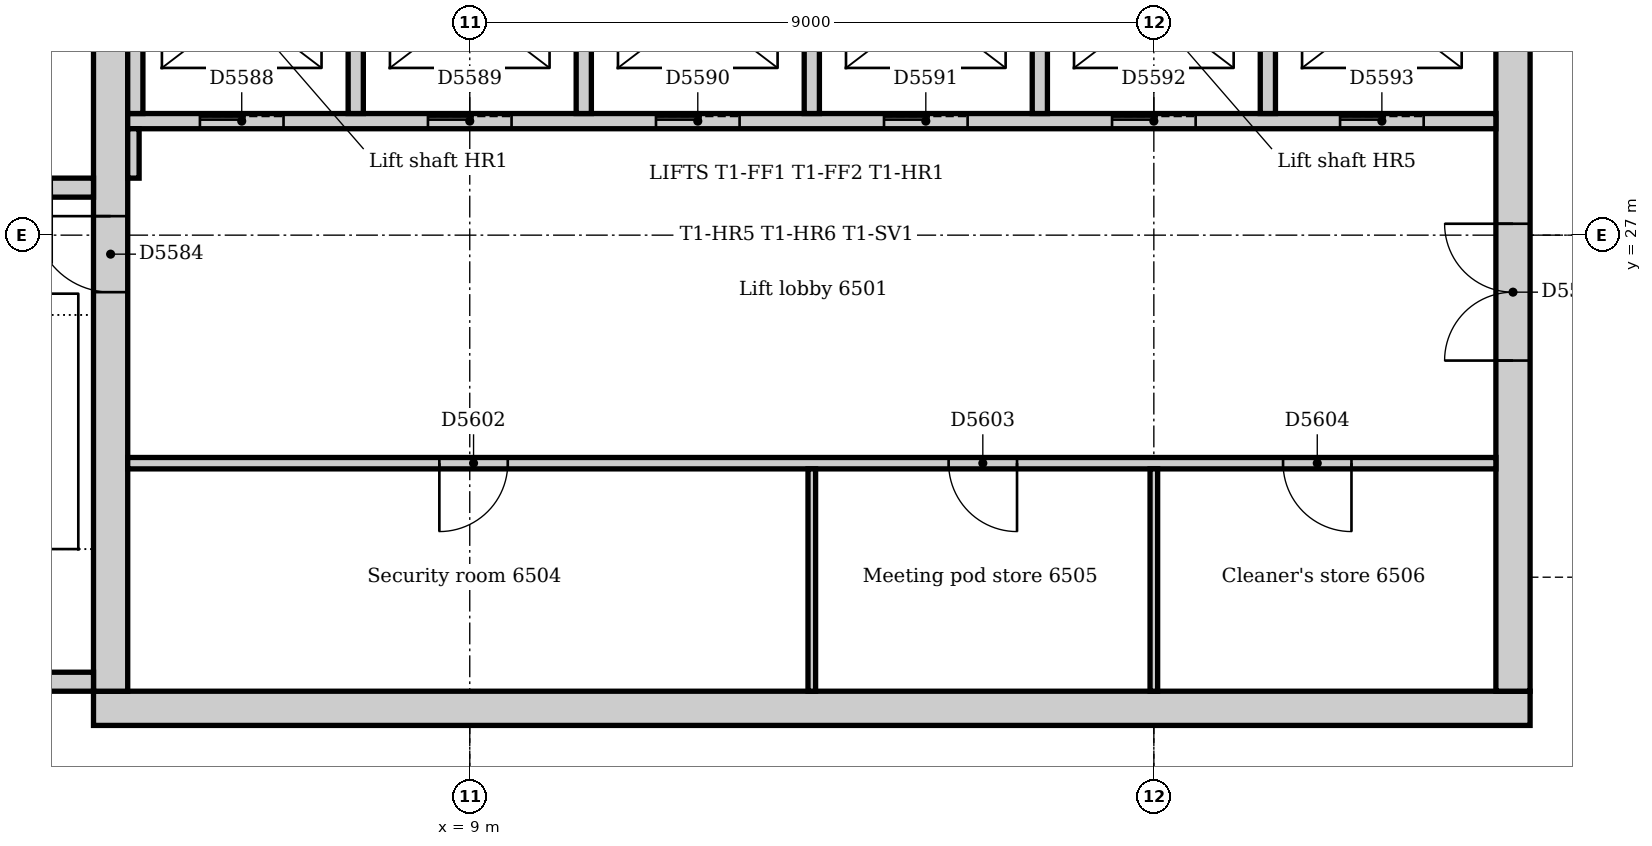
"""IFC4 building model, lengths in metres.
Left out: names, types, materials, properties, quantities, classifications, styles, units other than length and angle.
Written with IfcOpenShell. Run it as: python <this file> out.ifc"""

import sys

from ifc_helpers import new_model, si_unit, direction, frame, frame_2d, origin, place, context, subcontext, project, spatial, rectangle, extrude, element, fill, save


model = new_model("IFC4")
c1 = context("Model", 3, precision=1e-05, world=origin(), true_north=direction((0.0, 1.0)))
c2 = subcontext(c1, "Body", "Model", "MODEL_VIEW")
j1 = project(units=[si_unit("LENGTHUNIT", "METRE"), si_unit("PLANEANGLEUNIT", "RADIAN")], contexts=[c1])
p1 = place(None, origin())
s1 = spatial("IfcSite", under=j1, at=p1, CompositionType="ELEMENT")
p2 = place(p1, origin())
s2 = spatial("IfcBuilding", under=s1, at=p2, CompositionType="ELEMENT")
p3 = place(p2, frame((0.0, 0.0, 271.0)))
s3 = spatial("IfcBuildingStorey", under=s2, at=p3, CompositionType="ELEMENT", Elevation=271.0)
p4 = place(p3, frame((4.05, 20.775, 0.0), z_axis=(0.0, 0.0, 1.0), x_axis=(1.0, 0.0, 0.0)))
e1 = element("IfcWall", 1, at=p4, inside=s3, PredefinedType="SOLIDWALL", context=c2, shape_type="SweptSolid", body=[
    extrude(rectangle(XDim=18.9, YDim=0.45, at=frame_2d((9.45, 0.0))), origin(), (0.0, 0.0, 1.0), 4.0),
])
p5 = place(p3, frame((22.725, 21.0, 0.0), z_axis=(0.0, 0.0, 1.0), x_axis=(0.0, 1.0, 0.0)))
e2 = element("IfcWall", 2, at=p5, inside=s3, PredefinedType="SOLIDWALL", context=c2, shape_type="SweptSolid", body=[
    extrude(rectangle(XDim=10.5, YDim=0.45, at=frame_2d((5.25, 0.0))), origin(), (0.0, 0.0, 1.0), 4.0),
])
p6 = place(p5, frame((4.35, 0.0, 0.0)))
e3 = element("IfcOpeningElement", 3, at=p6, cuts=e2, PredefinedType="OPENING", context=c2, shape_type="SweptSolid", body=[
    extrude(rectangle(XDim=1.8, YDim=2.1, at=frame_2d((0.9, 1.05))), frame((0.0, 0.235, 0.0), z_axis=(0.0, -1.0, 0.0), x_axis=(1.0, 0.0, 0.0)), (0.0, 0.0, 1.0), 0.47),
])
p7 = place(p3, frame((4.275, 31.5, 0.0), z_axis=(0.0, 0.0, 1.0), x_axis=(0.0, -1.0, 0.0)))
e4 = element("IfcWall", 4, at=p7, inside=s3, PredefinedType="SOLIDWALL", context=c2, shape_type="SweptSolid", body=[
    extrude(rectangle(XDim=10.5, YDim=0.45, at=frame_2d((5.25, 0.0))), origin(), (0.0, 0.0, 1.0), 4.0),
])
p8 = place(p7, frame((4.25, 0.0, 0.0)))
e5 = element("IfcOpeningElement", 5, at=p8, cuts=e4, PredefinedType="OPENING", context=c2, shape_type="SweptSolid", body=[
    extrude(rectangle(XDim=1.0, YDim=2.1, at=frame_2d((0.5, 1.05))), frame((0.0, 0.235, 0.0), z_axis=(0.0, -1.0, 0.0), x_axis=(1.0, 0.0, 0.0)), (0.0, 0.0, 1.0), 0.47),
])
p9 = place(p3, frame((0.36, 21.125, 0.0), z_axis=(0.0, 0.0, 1.0), x_axis=(1.0, 0.0, 0.0)))
e6 = element("IfcWall", 6, at=p9, inside=s3, PredefinedType="SOLIDWALL", context=c2, shape_type="SweptSolid", body=[
    extrude(rectangle(XDim=3.69, YDim=0.25, at=frame_2d((1.845, 0.0))), origin(), (0.0, 0.0, 1.0), 4.0),
])
p10 = place(p3, frame((4.05, 27.625, 0.0), z_axis=(0.0, 0.0, 1.0), x_axis=(-1.0, 0.0, 0.0)))
e7 = element("IfcWall", 7, at=p10, inside=s3, PredefinedType="SOLIDWALL", context=c2, shape_type="SweptSolid", body=[
    extrude(rectangle(XDim=3.69, YDim=0.25, at=frame_2d((1.845, 0.0))), origin(), (0.0, 0.0, 1.0), 4.0),
])
p11 = place(p10, frame((0.55, 0.0, 0.0)))
e8 = element("IfcOpeningElement", 8, at=p11, cuts=e7, PredefinedType="OPENING", context=c2, shape_type="SweptSolid", body=[
    extrude(rectangle(XDim=1.0, YDim=2.1, at=frame_2d((0.5, 1.05))), frame((0.0, 0.135, 0.0), z_axis=(0.0, -1.0, 0.0), x_axis=(1.0, 0.0, 0.0)), (0.0, 0.0, 1.0), 0.27),
])
p12 = place(p3, frame((4.5, 28.5, 0.0), z_axis=(0.0, 0.0, 1.0), x_axis=(1.0, 0.0, 0.0)))
e9 = element("IfcWall", 9, at=p12, inside=s3, PredefinedType="PARTITIONING", context=c2, shape_type="SweptSolid", body=[
    extrude(rectangle(XDim=18.0, YDim=0.2, at=frame_2d((9.0, 0.0))), origin(), (0.0, 0.0, 1.0), 3.85),
])
p13 = place(p12, frame((0.95, 0.0, 0.0)))
e10 = element("IfcOpeningElement", 10, at=p13, cuts=e9, PredefinedType="OPENING", context=c2, shape_type="SweptSolid", body=[
    extrude(rectangle(XDim=1.1, YDim=2.1, at=frame_2d((0.55, 1.05))), frame((0.0, 0.11, 0.0), z_axis=(0.0, -1.0, 0.0), x_axis=(1.0, 0.0, 0.0)), (0.0, 0.0, 1.0), 0.22),
])
p14 = place(p12, frame((3.95, 0.0, 0.0)))
e11 = element("IfcOpeningElement", 11, at=p14, cuts=e9, PredefinedType="OPENING", context=c2, shape_type="SweptSolid", body=[
    extrude(rectangle(XDim=1.1, YDim=2.1, at=frame_2d((0.55, 1.05))), frame((0.0, 0.11, 0.0), z_axis=(0.0, -1.0, 0.0), x_axis=(1.0, 0.0, 0.0)), (0.0, 0.0, 1.0), 0.22),
])
p15 = place(p12, frame((6.95, 0.0, 0.0)))
e12 = element("IfcOpeningElement", 12, at=p15, cuts=e9, PredefinedType="OPENING", context=c2, shape_type="SweptSolid", body=[
    extrude(rectangle(XDim=1.1, YDim=2.1, at=frame_2d((0.55, 1.05))), frame((0.0, 0.11, 0.0), z_axis=(0.0, -1.0, 0.0), x_axis=(1.0, 0.0, 0.0)), (0.0, 0.0, 1.0), 0.22),
])
p16 = place(p12, frame((9.95, 0.0, 0.0)))
e13 = element("IfcOpeningElement", 13, at=p16, cuts=e9, PredefinedType="OPENING", context=c2, shape_type="SweptSolid", body=[
    extrude(rectangle(XDim=1.1, YDim=2.1, at=frame_2d((0.55, 1.05))), frame((0.0, 0.11, 0.0), z_axis=(0.0, -1.0, 0.0), x_axis=(1.0, 0.0, 0.0)), (0.0, 0.0, 1.0), 0.22),
])
p17 = place(p12, frame((12.95, 0.0, 0.0)))
e14 = element("IfcOpeningElement", 14, at=p17, cuts=e9, PredefinedType="OPENING", context=c2, shape_type="SweptSolid", body=[
    extrude(rectangle(XDim=1.1, YDim=2.1, at=frame_2d((0.55, 1.05))), frame((0.0, 0.11, 0.0), z_axis=(0.0, -1.0, 0.0), x_axis=(1.0, 0.0, 0.0)), (0.0, 0.0, 1.0), 0.22),
])
p18 = place(p12, frame((15.95, 0.0, 0.0)))
e15 = element("IfcOpeningElement", 15, at=p18, cuts=e9, PredefinedType="OPENING", context=c2, shape_type="SweptSolid", body=[
    extrude(rectangle(XDim=1.1, YDim=2.1, at=frame_2d((0.55, 1.05))), frame((0.0, 0.11, 0.0), z_axis=(0.0, -1.0, 0.0), x_axis=(1.0, 0.0, 0.0)), (0.0, 0.0, 1.0), 0.22),
])
for number, where, z_axis, x_axis in (
    (16, (10.5, 28.6, 0.0), (0.0, 0.0, 1.0), (0.0, 1.0, 0.0)),
    (17, (13.5, 28.6, 0.0), (0.0, 0.0, 1.0), (0.0, 1.0, 0.0)),
    (18, (16.5, 28.6, 0.0), (0.0, 0.0, 1.0), (0.0, 1.0, 0.0)),
    (19, (19.5, 28.6, 0.0), (0.0, 0.0, 1.0), (0.0, 1.0, 0.0)),
    (20, (4.6, 28.6, 0.0), (0.0, 0.0, 1.0), (0.0, 1.0, 0.0)),
    (21, (7.5, 28.6, 0.0), (0.0, 0.0, 1.0), (0.0, 1.0, 0.0)),
):
    element("IfcWall", number, at=place(p3, frame(where, z_axis=z_axis, x_axis=x_axis)), inside=s3, PredefinedType="PARTITIONING", context=c2, shape_type="SweptSolid", body=[
        extrude(rectangle(XDim=2.65, YDim=0.2, at=frame_2d((1.325, 0.0))), origin(), (0.0, 0.0, 1.0), 3.85),
    ])
p19 = place(p3, frame((4.5, 24.0, 0.0), z_axis=(0.0, 0.0, 1.0), x_axis=(1.0, 0.0, 0.0)))
e22 = element("IfcWall", 22, at=p19, inside=s3, PredefinedType="PARTITIONING", context=c2, shape_type="SweptSolid", body=[
    extrude(rectangle(XDim=18.0, YDim=0.15, at=frame_2d((9.0, 0.0))), origin(), (0.0, 0.0, 1.0), 3.85),
])
p20 = place(p19, frame((4.1, 0.0, 0.0)))
e23 = element("IfcOpeningElement", 23, at=p20, cuts=e22, PredefinedType="OPENING", context=c2, shape_type="SweptSolid", body=[
    extrude(rectangle(XDim=0.9, YDim=2.1, at=frame_2d((0.45, 1.05))), frame((0.0, 0.085, 0.0), z_axis=(0.0, -1.0, 0.0), x_axis=(1.0, 0.0, 0.0)), (0.0, 0.0, 1.0), 0.17),
])
p21 = place(p19, frame((10.8, 0.0, 0.0)))
e24 = element("IfcOpeningElement", 24, at=p21, cuts=e22, PredefinedType="OPENING", context=c2, shape_type="SweptSolid", body=[
    extrude(rectangle(XDim=0.9, YDim=2.1, at=frame_2d((0.45, 1.05))), frame((0.0, 0.085, 0.0), z_axis=(0.0, -1.0, 0.0), x_axis=(1.0, 0.0, 0.0)), (0.0, 0.0, 1.0), 0.17),
])
p22 = place(p19, frame((15.2, 0.0, 0.0)))
e25 = element("IfcOpeningElement", 25, at=p22, cuts=e22, PredefinedType="OPENING", context=c2, shape_type="SweptSolid", body=[
    extrude(rectangle(XDim=0.9, YDim=2.1, at=frame_2d((0.45, 1.05))), frame((0.0, 0.085, 0.0), z_axis=(0.0, -1.0, 0.0), x_axis=(1.0, 0.0, 0.0)), (0.0, 0.0, 1.0), 0.17),
])
p23 = place(p3, frame((4.575, 27.75, 0.0), z_axis=(0.0, 0.0, 1.0), x_axis=(0.0, 1.0, 0.0)))
e26 = element("IfcWall", 26, at=p23, inside=s3, PredefinedType="PARTITIONING", context=c2, shape_type="SweptSolid", body=[
    extrude(rectangle(XDim=0.65, YDim=0.15, at=frame_2d((0.325, 0.0))), origin(), (0.0, 0.0, 1.0), 3.85),
])
for number, where, z_axis, x_axis in (
    (27, (13.5, 21.0, 0.0), (0.0, 0.0, 1.0), (0.0, 1.0, 0.0)),
    (28, (18.0, 21.0, 0.0), (0.0, 0.0, 1.0), (0.0, 1.0, 0.0)),
):
    element("IfcWall", number, at=place(p3, frame(where, z_axis=z_axis, x_axis=x_axis)), inside=s3, PredefinedType="PARTITIONING", context=c2, shape_type="SweptSolid", body=[
        extrude(rectangle(XDim=2.925, YDim=0.1, at=frame_2d((1.462, 0.0))), origin(), (0.0, 0.0, 1.0), 3.85),
    ])
p24 = place(p8, frame((1.0, 0.0, 0.0), z_axis=(0.0, 0.0, 1.0), x_axis=(-1.0, 0.0, 0.0)))
e29 = element("IfcDoor", 29, at=p24, inside=s3, OperationType="SINGLE_SWING_RIGHT", PredefinedType="DOOR", context=c2, shape_type="SweptSolid", body=[
    extrude(rectangle(XDim=1.0, YDim=2.1, at=frame_2d((0.5, 1.05))), frame((0.0, 0.025, 0.0), z_axis=(0.0, -1.0, 0.0), x_axis=(1.0, 0.0, 0.0)), (0.0, 0.0, 1.0), 0.05),
])
fill(e5, e29)
p25 = place(p13, origin())
e30 = element("IfcDoor", 30, at=p25, inside=s3, OperationType="SLIDING_TO_LEFT", PredefinedType="DOOR", context=c2, shape_type="SweptSolid", body=[
    extrude(rectangle(XDim=1.1, YDim=2.1, at=frame_2d((0.55, 1.05))), frame((0.0, 0.025, 0.0), z_axis=(0.0, -1.0, 0.0), x_axis=(1.0, 0.0, 0.0)), (0.0, 0.0, 1.0), 0.05),
])
fill(e10, e30)
p26 = place(p14, origin())
e31 = element("IfcDoor", 31, at=p26, inside=s3, OperationType="SLIDING_TO_LEFT", PredefinedType="DOOR", context=c2, shape_type="SweptSolid", body=[
    extrude(rectangle(XDim=1.1, YDim=2.1, at=frame_2d((0.55, 1.05))), frame((0.0, 0.025, 0.0), z_axis=(0.0, -1.0, 0.0), x_axis=(1.0, 0.0, 0.0)), (0.0, 0.0, 1.0), 0.05),
])
fill(e11, e31)
p27 = place(p15, origin())
e32 = element("IfcDoor", 32, at=p27, inside=s3, OperationType="SLIDING_TO_LEFT", PredefinedType="DOOR", context=c2, shape_type="SweptSolid", body=[
    extrude(rectangle(XDim=1.1, YDim=2.1, at=frame_2d((0.55, 1.05))), frame((0.0, 0.025, 0.0), z_axis=(0.0, -1.0, 0.0), x_axis=(1.0, 0.0, 0.0)), (0.0, 0.0, 1.0), 0.05),
])
fill(e12, e32)
p28 = place(p16, origin())
e33 = element("IfcDoor", 33, at=p28, inside=s3, OperationType="SLIDING_TO_LEFT", PredefinedType="DOOR", context=c2, shape_type="SweptSolid", body=[
    extrude(rectangle(XDim=1.1, YDim=2.1, at=frame_2d((0.55, 1.05))), frame((0.0, 0.025, 0.0), z_axis=(0.0, -1.0, 0.0), x_axis=(1.0, 0.0, 0.0)), (0.0, 0.0, 1.0), 0.05),
])
fill(e13, e33)
p29 = place(p17, origin())
e34 = element("IfcDoor", 34, at=p29, inside=s3, OperationType="SLIDING_TO_LEFT", PredefinedType="DOOR", context=c2, shape_type="SweptSolid", body=[
    extrude(rectangle(XDim=1.1, YDim=2.1, at=frame_2d((0.55, 1.05))), frame((0.0, 0.025, 0.0), z_axis=(0.0, -1.0, 0.0), x_axis=(1.0, 0.0, 0.0)), (0.0, 0.0, 1.0), 0.05),
])
fill(e14, e34)
p30 = place(p18, origin())
e35 = element("IfcDoor", 35, at=p30, inside=s3, OperationType="SLIDING_TO_LEFT", PredefinedType="DOOR", context=c2, shape_type="SweptSolid", body=[
    extrude(rectangle(XDim=1.1, YDim=2.1, at=frame_2d((0.55, 1.05))), frame((0.0, 0.025, 0.0), z_axis=(0.0, -1.0, 0.0), x_axis=(1.0, 0.0, 0.0)), (0.0, 0.0, 1.0), 0.05),
])
fill(e15, e35)
p31 = place(p6, origin())
e36 = element("IfcDoor", 36, at=p31, inside=s3, OperationType="DOUBLE_DOOR_DOUBLE_SWING", PredefinedType="DOOR", context=c2, shape_type="SweptSolid", body=[
    extrude(rectangle(XDim=1.8, YDim=2.1, at=frame_2d((0.9, 1.05))), frame((0.0, 0.025, 0.0), z_axis=(0.0, -1.0, 0.0), x_axis=(1.0, 0.0, 0.0)), (0.0, 0.0, 1.0), 0.05),
])
fill(e3, e36)
p32 = place(p20, frame((0.9, 0.0, 0.0), z_axis=(0.0, 0.0, 1.0), x_axis=(-1.0, 0.0, 0.0)))
e37 = element("IfcDoor", 37, at=p32, inside=s3, OperationType="SINGLE_SWING_RIGHT", PredefinedType="DOOR", context=c2, shape_type="SweptSolid", body=[
    extrude(rectangle(XDim=0.9, YDim=2.1, at=frame_2d((0.45, 1.05))), frame((0.0, 0.025, 0.0), z_axis=(0.0, -1.0, 0.0), x_axis=(1.0, 0.0, 0.0)), (0.0, 0.0, 1.0), 0.05),
])
fill(e23, e37)
p33 = place(p21, frame((0.9, 0.0, 0.0), z_axis=(0.0, 0.0, 1.0), x_axis=(-1.0, 0.0, 0.0)))
e38 = element("IfcDoor", 38, at=p33, inside=s3, OperationType="SINGLE_SWING_LEFT", PredefinedType="DOOR", context=c2, shape_type="SweptSolid", body=[
    extrude(rectangle(XDim=0.9, YDim=2.1, at=frame_2d((0.45, 1.05))), frame((0.0, 0.025, 0.0), z_axis=(0.0, -1.0, 0.0), x_axis=(1.0, 0.0, 0.0)), (0.0, 0.0, 1.0), 0.05),
])
fill(e24, e38)
p34 = place(p22, frame((0.9, 0.0, 0.0), z_axis=(0.0, 0.0, 1.0), x_axis=(-1.0, 0.0, 0.0)))
e39 = element("IfcDoor", 39, at=p34, inside=s3, OperationType="SINGLE_SWING_LEFT", PredefinedType="DOOR", context=c2, shape_type="SweptSolid", body=[
    extrude(rectangle(XDim=0.9, YDim=2.1, at=frame_2d((0.45, 1.05))), frame((0.0, 0.025, 0.0), z_axis=(0.0, -1.0, 0.0), x_axis=(1.0, 0.0, 0.0)), (0.0, 0.0, 1.0), 0.05),
])
fill(e25, e39)
save(model, sys.argv[1])
